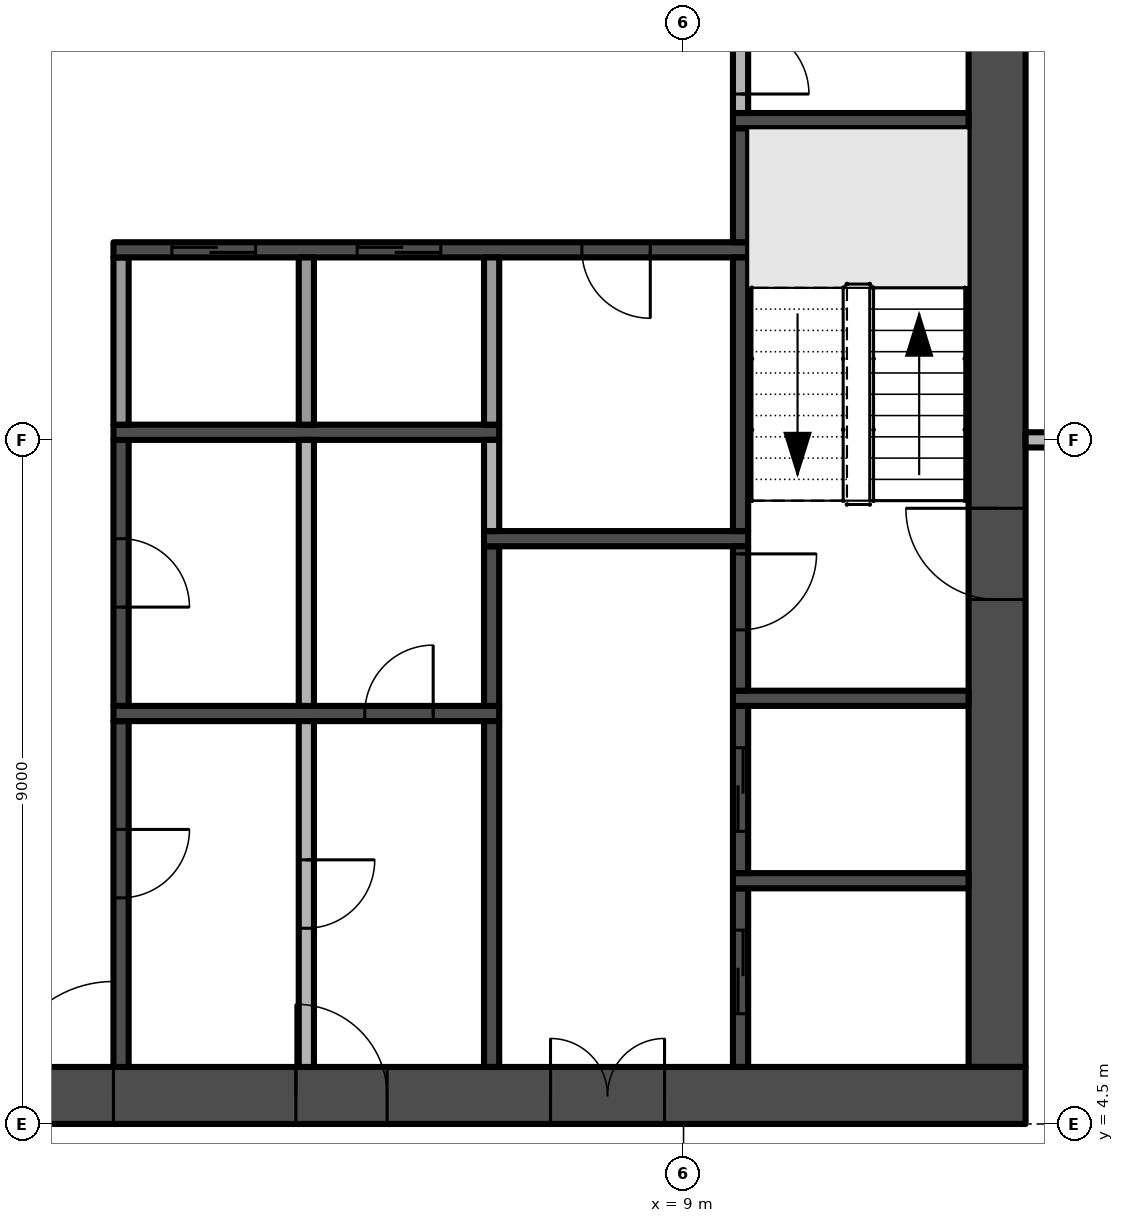
"""IFC4 building model, lengths in metres.
Left out: names, types, materials, properties, quantities, classifications, styles, units other than length and angle.
Written with IfcOpenShell. Run it as: python <this file> out.ifc"""

import sys

from ifc_helpers import new_model, si_unit, direction, frame, frame_2d, origin, place, context, subcontext, project, spatial, rectangle, extrude, element, fill, save


model = new_model("IFC4")
c1 = context("Model", 3, precision=1e-05, world=origin(), true_north=direction((0.0, 1.0)))
c2 = subcontext(c1, "Body", "Model", "MODEL_VIEW")
j1 = project(units=[si_unit("LENGTHUNIT", "METRE"), si_unit("PLANEANGLEUNIT", "RADIAN")], contexts=[c1])
p1 = place(None, origin())
s1 = spatial("IfcSite", under=j1, at=p1, CompositionType="ELEMENT")
p2 = place(p1, origin())
s2 = spatial("IfcBuilding", under=s1, at=p2, CompositionType="ELEMENT")
p3 = place(p2, frame((0.0, 0.0, 140.2)))
s3 = spatial("IfcBuildingStorey", under=s2, at=p3, CompositionType="ELEMENT", Elevation=140.2)
p4 = place(p3, frame((-13.5, 4.875, -0.3), z_axis=(0.0, 0.0, 1.0), x_axis=(1.0, 0.0, 0.0)))
e1 = element("IfcWall", 1, at=p4, inside=s3, PredefinedType="SHEAR", context=c2, shape_type="SweptSolid", body=[
    extrude(rectangle(XDim=27.0, YDim=0.75, at=frame_2d((13.5, 0.0))), origin(), (0.0, 0.0, 1.0), 3.8),
])
p5 = place(p4, frame((12.0, 0.0, 0.3)))
e2 = element("IfcOpeningElement", 2, at=p5, cuts=e1, PredefinedType="OPENING", context=c2, shape_type="SweptSolid", body=[
    extrude(rectangle(XDim=3.0, YDim=2.4, at=frame_2d((1.5, 1.2))), frame((0.0, 0.385, 0.0), z_axis=(0.0, -1.0, 0.0), x_axis=(1.0, 0.0, 0.0)), (0.0, 0.0, 1.0), 0.77),
])
p6 = place(p4, frame((4.9, 0.0, 0.3)))
e3 = element("IfcOpeningElement", 3, at=p6, cuts=e1, PredefinedType="OPENING", context=c2, shape_type="SweptSolid", body=[
    extrude(rectangle(XDim=1.2, YDim=2.2, at=frame_2d((0.6, 1.1))), frame((0.0, 0.385, 0.0), z_axis=(0.0, -1.0, 0.0), x_axis=(1.0, 0.0, 0.0)), (0.0, 0.0, 1.0), 0.77),
])
p7 = place(p4, frame((20.75, 0.0, 0.3)))
e4 = element("IfcOpeningElement", 4, at=p7, cuts=e1, PredefinedType="OPENING", context=c2, shape_type="SweptSolid", body=[
    extrude(rectangle(XDim=1.5, YDim=2.2, at=frame_2d((0.75, 1.1))), frame((0.0, 0.385, 0.0), z_axis=(0.0, -1.0, 0.0), x_axis=(1.0, 0.0, 0.0)), (0.0, 0.0, 1.0), 0.77),
])
p8 = place(p4, frame((17.4, 0.0, 0.3)))
e5 = element("IfcOpeningElement", 5, at=p8, cuts=e1, PredefinedType="OPENING", context=c2, shape_type="SweptSolid", body=[
    extrude(rectangle(XDim=1.2, YDim=2.2, at=frame_2d((0.6, 1.1))), frame((0.0, 0.385, 0.0), z_axis=(0.0, -1.0, 0.0), x_axis=(1.0, 0.0, 0.0)), (0.0, 0.0, 1.0), 0.77),
])
p9 = place(p3, frame((13.125, 5.25, -0.3), z_axis=(0.0, 0.0, 1.0), x_axis=(0.0, 1.0, 0.0)))
e6 = element("IfcWall", 6, at=p9, inside=s3, PredefinedType="SHEAR", context=c2, shape_type="SweptSolid", body=[
    extrude(rectangle(XDim=16.5, YDim=0.75, at=frame_2d((8.25, 0.0))), origin(), (0.0, 0.0, 1.0), 3.8),
])
p10 = place(p9, frame((6.15, 0.0, 0.3)))
e7 = element("IfcOpeningElement", 7, at=p10, cuts=e6, PredefinedType="OPENING", context=c2, shape_type="SweptSolid", body=[
    extrude(rectangle(XDim=1.2, YDim=2.2, at=frame_2d((0.6, 1.1))), frame((0.0, 0.385, 0.0), z_axis=(0.0, -1.0, 0.0), x_axis=(1.0, 0.0, 0.0)), (0.0, 0.0, 1.0), 0.77),
])
p11 = place(p3, frame((1.6, 9.8, 0.0), z_axis=(0.0, 0.0, 1.0), x_axis=(0.0, -1.0, 0.0)))
e8 = element("IfcWall", 8, at=p11, inside=s3, PredefinedType="SHEAR", context=c2, shape_type="SweptSolid", body=[
    extrude(rectangle(XDim=4.55, YDim=0.2, at=frame_2d((2.275, 0.0))), origin(), (0.0, 0.0, 1.0), 3.5),
])
p12 = place(p11, frame((1.425, 0.0, 0.0)))
e9 = element("IfcOpeningElement", 9, at=p12, cuts=e8, PredefinedType="OPENING", context=c2, shape_type="SweptSolid", body=[
    extrude(rectangle(XDim=0.9, YDim=2.1, at=frame_2d((0.45, 1.05))), frame((0.0, 0.11, 0.0), z_axis=(0.0, -1.0, 0.0), x_axis=(1.0, 0.0, 0.0)), (0.0, 0.0, 1.0), 0.22),
])
p13 = place(p3, frame((1.5, 9.9, 0.0), z_axis=(0.0, 0.0, 1.0), x_axis=(1.0, 0.0, 0.0)))
e10 = element("IfcWall", 10, at=p13, inside=s3, PredefinedType="SHEAR", context=c2, shape_type="SweptSolid", body=[
    extrude(rectangle(XDim=5.075, YDim=0.2, at=frame_2d((2.538, 0.0))), origin(), (0.0, 0.0, 1.0), 3.5),
])
p14 = place(p13, frame((3.306, 0.0, 0.0)))
e11 = element("IfcOpeningElement", 11, at=p14, cuts=e10, PredefinedType="OPENING", context=c2, shape_type="SweptSolid", body=[
    extrude(rectangle(XDim=0.9, YDim=2.1, at=frame_2d((0.45, 1.05))), frame((0.0, 0.11, 0.0), z_axis=(0.0, -1.0, 0.0), x_axis=(1.0, 0.0, 0.0)), (0.0, 0.0, 1.0), 0.22),
])
p15 = place(p3, frame((1.6, 13.5, 0.0), z_axis=(0.0, 0.0, 1.0), x_axis=(0.0, -1.0, 0.0)))
e12 = element("IfcWall", 12, at=p15, inside=s3, PredefinedType="SHEAR", context=c2, shape_type="SweptSolid", body=[
    extrude(rectangle(XDim=3.5, YDim=0.2, at=frame_2d((1.75, 0.0))), origin(), (0.0, 0.0, 1.0), 3.5),
])
p16 = place(p15, frame((1.3, 0.0, 0.0)))
e13 = element("IfcOpeningElement", 13, at=p16, cuts=e12, PredefinedType="OPENING", context=c2, shape_type="SweptSolid", body=[
    extrude(rectangle(XDim=0.9, YDim=2.1, at=frame_2d((0.45, 1.05))), frame((0.0, 0.11, 0.0), z_axis=(0.0, -1.0, 0.0), x_axis=(1.0, 0.0, 0.0)), (0.0, 0.0, 1.0), 0.22),
])
p17 = place(p3, frame((1.5, 13.6, 0.0), z_axis=(0.0, 0.0, 1.0), x_axis=(1.0, 0.0, 0.0)))
e14 = element("IfcWall", 14, at=p17, inside=s3, PredefinedType="SHEAR", context=c2, shape_type="SweptSolid", body=[
    extrude(rectangle(XDim=5.075, YDim=0.2, at=frame_2d((2.538, 0.0))), origin(), (0.0, 0.0, 1.0), 3.5),
])
p18 = place(p3, frame((1.6, 13.7, 0.0), z_axis=(0.0, 0.0, 1.0), x_axis=(0.0, 1.0, 0.0)))
e15 = element("IfcWall", 15, at=p18, inside=s3, PredefinedType="PARTITIONING", context=c2, shape_type="SweptSolid", body=[
    extrude(rectangle(XDim=2.2, YDim=0.2, at=frame_2d((1.1, 0.0))), origin(), (0.0, 0.0, 1.0), 3.5),
])
p19 = place(p3, frame((9.85, 16.0, 0.0), z_axis=(0.0, 0.0, 1.0), x_axis=(-1.0, 0.0, 0.0)))
e16 = element("IfcWall", 16, at=p19, inside=s3, PredefinedType="SHEAR", context=c2, shape_type="SweptSolid", body=[
    extrude(rectangle(XDim=8.35, YDim=0.2, at=frame_2d((4.175, 0.0))), origin(), (0.0, 0.0, 1.0), 3.5),
])
p20 = place(p19, frame((6.481, 0.0, 0.0)))
e17 = element("IfcOpeningElement", 17, at=p20, cuts=e16, PredefinedType="OPENING", context=c2, shape_type="SweptSolid", body=[
    extrude(rectangle(XDim=1.1, YDim=2.1, at=frame_2d((0.55, 1.05))), frame((0.0, 0.11, 0.0), z_axis=(0.0, -1.0, 0.0), x_axis=(1.0, 0.0, 0.0)), (0.0, 0.0, 1.0), 0.22),
])
p21 = place(p19, frame((4.044, 0.0, 0.0)))
e18 = element("IfcOpeningElement", 18, at=p21, cuts=e16, PredefinedType="OPENING", context=c2, shape_type="SweptSolid", body=[
    extrude(rectangle(XDim=1.1, YDim=2.1, at=frame_2d((0.55, 1.05))), frame((0.0, 0.11, 0.0), z_axis=(0.0, -1.0, 0.0), x_axis=(1.0, 0.0, 0.0)), (0.0, 0.0, 1.0), 0.22),
])
p22 = place(p19, frame((1.288, 0.0, 0.0)))
e19 = element("IfcOpeningElement", 19, at=p22, cuts=e16, PredefinedType="OPENING", context=c2, shape_type="SweptSolid", body=[
    extrude(rectangle(XDim=0.9, YDim=2.1, at=frame_2d((0.45, 1.05))), frame((0.0, 0.11, 0.0), z_axis=(0.0, -1.0, 0.0), x_axis=(1.0, 0.0, 0.0)), (0.0, 0.0, 1.0), 0.22),
])
p23 = place(p3, frame((4.037, 9.8, 0.0), z_axis=(0.0, 0.0, 1.0), x_axis=(0.0, -1.0, 0.0)))
e20 = element("IfcWall", 20, at=p23, inside=s3, PredefinedType="PARTITIONING", context=c2, shape_type="SweptSolid", body=[
    extrude(rectangle(XDim=4.55, YDim=0.2, at=frame_2d((2.275, 0.0))), origin(), (0.0, 0.0, 1.0), 3.5),
])
p24 = place(p23, frame((1.825, 0.0, 0.0)))
e21 = element("IfcOpeningElement", 21, at=p24, cuts=e20, PredefinedType="OPENING", context=c2, shape_type="SweptSolid", body=[
    extrude(rectangle(XDim=0.9, YDim=2.1, at=frame_2d((0.45, 1.05))), frame((0.0, 0.11, 0.0), z_axis=(0.0, -1.0, 0.0), x_axis=(1.0, 0.0, 0.0)), (0.0, 0.0, 1.0), 0.22),
])
p25 = place(p3, frame((4.037, 10.0, 0.0), z_axis=(0.0, 0.0, 1.0), x_axis=(0.0, 1.0, 0.0)))
e22 = element("IfcWall", 22, at=p25, inside=s3, PredefinedType="PARTITIONING", context=c2, shape_type="SweptSolid", body=[
    extrude(rectangle(XDim=3.5, YDim=0.2, at=frame_2d((1.75, 0.0))), origin(), (0.0, 0.0, 1.0), 3.5),
])
p26 = place(p3, frame((4.037, 13.7, 0.0), z_axis=(0.0, 0.0, 1.0), x_axis=(0.0, 1.0, 0.0)))
e23 = element("IfcWall", 23, at=p26, inside=s3, PredefinedType="PARTITIONING", context=c2, shape_type="SweptSolid", body=[
    extrude(rectangle(XDim=2.2, YDim=0.2, at=frame_2d((1.1, 0.0))), origin(), (0.0, 0.0, 1.0), 3.5),
])
p27 = place(p3, frame((6.475, 5.25, 0.0), z_axis=(0.0, 0.0, 1.0), x_axis=(0.0, 1.0, 0.0)))
e24 = element("IfcWall", 24, at=p27, inside=s3, PredefinedType="SHEAR", context=c2, shape_type="SweptSolid", body=[
    extrude(rectangle(XDim=4.55, YDim=0.2, at=frame_2d((2.275, 0.0))), origin(), (0.0, 0.0, 1.0), 3.5),
])
p28 = place(p3, frame((6.475, 10.0, 0.0), z_axis=(0.0, 0.0, 1.0), x_axis=(0.0, 1.0, 0.0)))
e25 = element("IfcWall", 25, at=p28, inside=s3, PredefinedType="SHEAR", context=c2, shape_type="SweptSolid", body=[
    extrude(rectangle(XDim=2.1, YDim=0.2, at=frame_2d((1.05, 0.0))), origin(), (0.0, 0.0, 1.0), 3.5),
])
p29 = place(p3, frame((6.375, 12.2, 0.0), z_axis=(0.0, 0.0, 1.0), x_axis=(1.0, 0.0, 0.0)))
e26 = element("IfcWall", 26, at=p29, inside=s3, PredefinedType="SHEAR", context=c2, shape_type="SweptSolid", body=[
    extrude(rectangle(XDim=3.475, YDim=0.2, at=frame_2d((1.738, 0.0))), origin(), (0.0, 0.0, 1.0), 3.5),
])
p30 = place(p3, frame((6.475, 12.3, 0.0), z_axis=(0.0, 0.0, 1.0), x_axis=(0.0, 1.0, 0.0)))
e27 = element("IfcWall", 27, at=p30, inside=s3, PredefinedType="PARTITIONING", context=c2, shape_type="SweptSolid", body=[
    extrude(rectangle(XDim=1.2, YDim=0.2, at=frame_2d((0.6, 0.0))), origin(), (0.0, 0.0, 1.0), 3.5),
])
p31 = place(p3, frame((6.475, 13.7, 0.0), z_axis=(0.0, 0.0, 1.0), x_axis=(0.0, 1.0, 0.0)))
e28 = element("IfcWall", 28, at=p31, inside=s3, PredefinedType="PARTITIONING", context=c2, shape_type="SweptSolid", body=[
    extrude(rectangle(XDim=2.2, YDim=0.2, at=frame_2d((1.1, 0.0))), origin(), (0.0, 0.0, 1.0), 3.5),
])
p32 = place(p3, frame((9.75, 5.25, 0.0), z_axis=(0.0, 0.0, 1.0), x_axis=(0.0, 1.0, 0.0)))
e29 = element("IfcWall", 29, at=p32, inside=s3, PredefinedType="SHEAR", context=c2, shape_type="SweptSolid", body=[
    extrude(rectangle(XDim=2.35, YDim=0.2, at=frame_2d((1.175, 0.0))), origin(), (0.0, 0.0, 1.0), 3.5),
])
p33 = place(p32, frame((0.7, 0.0, 0.0)))
e30 = element("IfcOpeningElement", 30, at=p33, cuts=e29, PredefinedType="OPENING", context=c2, shape_type="SweptSolid", body=[
    extrude(rectangle(XDim=1.1, YDim=2.1, at=frame_2d((0.55, 1.05))), frame((0.0, 0.11, 0.0), z_axis=(0.0, -1.0, 0.0), x_axis=(1.0, 0.0, 0.0)), (0.0, 0.0, 1.0), 0.22),
])
p34 = place(p3, frame((9.65, 7.7, 0.0), z_axis=(0.0, 0.0, 1.0), x_axis=(1.0, 0.0, 0.0)))
e31 = element("IfcWall", 31, at=p34, inside=s3, PredefinedType="SHEAR", context=c2, shape_type="SweptSolid", body=[
    extrude(rectangle(XDim=3.1, YDim=0.2, at=frame_2d((1.55, 0.0))), origin(), (0.0, 0.0, 1.0), 3.5),
])
p35 = place(p3, frame((9.75, 7.8, 0.0), z_axis=(0.0, 0.0, 1.0), x_axis=(0.0, 1.0, 0.0)))
e32 = element("IfcWall", 32, at=p35, inside=s3, PredefinedType="SHEAR", context=c2, shape_type="SweptSolid", body=[
    extrude(rectangle(XDim=2.2, YDim=0.2, at=frame_2d((1.1, 0.0))), origin(), (0.0, 0.0, 1.0), 3.5),
])
p36 = place(p35, frame((0.55, 0.0, 0.0)))
e33 = element("IfcOpeningElement", 33, at=p36, cuts=e32, PredefinedType="OPENING", context=c2, shape_type="SweptSolid", body=[
    extrude(rectangle(XDim=1.1, YDim=2.1, at=frame_2d((0.55, 1.05))), frame((0.0, 0.11, 0.0), z_axis=(0.0, -1.0, 0.0), x_axis=(1.0, 0.0, 0.0)), (0.0, 0.0, 1.0), 0.22),
])
p37 = place(p3, frame((9.65, 10.1, 0.0), z_axis=(0.0, 0.0, 1.0), x_axis=(1.0, 0.0, 0.0)))
e34 = element("IfcWall", 34, at=p37, inside=s3, PredefinedType="SHEAR", context=c2, shape_type="SweptSolid", body=[
    extrude(rectangle(XDim=3.1, YDim=0.2, at=frame_2d((1.55, 0.0))), origin(), (0.0, 0.0, 1.0), 3.5),
])
p38 = place(p3, frame((9.75, 12.1, 0.0), z_axis=(0.0, 0.0, 1.0), x_axis=(0.0, -1.0, 0.0)))
e35 = element("IfcWall", 35, at=p38, inside=s3, PredefinedType="SHEAR", context=c2, shape_type="SweptSolid", body=[
    extrude(rectangle(XDim=1.9, YDim=0.2, at=frame_2d((0.95, 0.0))), origin(), (0.0, 0.0, 1.0), 3.5),
])
p39 = place(p38, frame((0.1, 0.0, 0.0)))
e36 = element("IfcOpeningElement", 36, at=p39, cuts=e35, PredefinedType="OPENING", context=c2, shape_type="SweptSolid", body=[
    extrude(rectangle(XDim=1.0, YDim=2.2, at=frame_2d((0.5, 1.1))), frame((0.0, 0.11, 0.0), z_axis=(0.0, -1.0, 0.0), x_axis=(1.0, 0.0, 0.0)), (0.0, 0.0, 1.0), 0.22),
])
p40 = place(p3, frame((9.75, 12.3, 0.0), z_axis=(0.0, 0.0, 1.0), x_axis=(0.0, 1.0, 0.0)))
e37 = element("IfcWall", 37, at=p40, inside=s3, PredefinedType="SHEAR", context=c2, shape_type="SweptSolid", body=[
    extrude(rectangle(XDim=3.6, YDim=0.2, at=frame_2d((1.8, 0.0))), origin(), (0.0, 0.0, 1.0), 3.5),
])
p41 = place(p3, frame((9.75, 16.1, 0.0), z_axis=(0.0, 0.0, 1.0), x_axis=(0.0, 1.0, 0.0)))
e38 = element("IfcWall", 38, at=p41, inside=s3, PredefinedType="SHEAR", context=c2, shape_type="SweptSolid", body=[
    extrude(rectangle(XDim=1.5, YDim=0.2, at=frame_2d((0.75, 0.0))), origin(), (0.0, 0.0, 1.0), 3.5),
])
p42 = place(p3, frame((9.65, 17.7, 0.0), z_axis=(0.0, 0.0, 1.0), x_axis=(1.0, 0.0, 0.0)))
e39 = element("IfcWall", 39, at=p42, inside=s3, PredefinedType="SHEAR", context=c2, shape_type="SweptSolid", body=[
    extrude(rectangle(XDim=3.1, YDim=0.2, at=frame_2d((1.55, 0.0))), origin(), (0.0, 0.0, 1.0), 3.5),
])
p43 = place(p3, frame((9.75, 19.2, 0.0), z_axis=(0.0, 0.0, 1.0), x_axis=(0.0, -1.0, 0.0)))
e40 = element("IfcWall", 40, at=p43, inside=s3, PredefinedType="PARTITIONING", context=c2, shape_type="SweptSolid", body=[
    extrude(rectangle(XDim=1.4, YDim=0.2, at=frame_2d((0.7, 0.0))), origin(), (0.0, 0.0, 1.0), 3.5),
])
p44 = place(p43, frame((0.25, 0.0, 0.0)))
e41 = element("IfcOpeningElement", 41, at=p44, cuts=e40, PredefinedType="OPENING", context=c2, shape_type="SweptSolid", body=[
    extrude(rectangle(XDim=0.9, YDim=2.1, at=frame_2d((0.45, 1.05))), frame((0.0, 0.11, 0.0), z_axis=(0.0, -1.0, 0.0), x_axis=(1.0, 0.0, 0.0)), (0.0, 0.0, 1.0), 0.22),
])
p45 = place(p3, frame((13.5, 13.5, 0.0), z_axis=(0.0, 0.0, 1.0), x_axis=(1.0, 0.0, 0.0)))
e42 = element("IfcWall", 42, at=p45, inside=s3, PredefinedType="PARTITIONING", context=c2, shape_type="SweptSolid", body=[
    extrude(rectangle(XDim=3.875, YDim=0.2, at=frame_2d((1.938, 0.0))), origin(), (0.0, 0.0, 1.0), 3.5),
])
p46 = place(p45, frame((1.6, 0.0, 0.0)))
e43 = element("IfcOpeningElement", 43, at=p46, cuts=e42, PredefinedType="OPENING", context=c2, shape_type="SweptSolid", body=[
    extrude(rectangle(XDim=0.9, YDim=2.1, at=frame_2d((0.45, 1.05))), frame((0.0, 0.11, 0.0), z_axis=(0.0, -1.0, 0.0), x_axis=(1.0, 0.0, 0.0)), (0.0, 0.0, 1.0), 0.22),
])
p47 = place(p5, frame((3.0, 0.0, 0.0), z_axis=(0.0, 0.0, 1.0), x_axis=(-1.0, 0.0, 0.0)))
e44 = element("IfcDoor", 44, at=p47, inside=s3, OperationType="DOUBLE_DOOR_SINGLE_SWING", PredefinedType="DOOR", context=c2, shape_type="SweptSolid", body=[
    extrude(rectangle(XDim=3.0, YDim=2.4, at=frame_2d((1.5, 1.2))), frame((0.0, 0.025, 0.0), z_axis=(0.0, -1.0, 0.0), x_axis=(1.0, 0.0, 0.0)), (0.0, 0.0, 1.0), 0.05),
])
fill(e2, e44)
p48 = place(p10, frame((1.2, 0.0, 0.0), z_axis=(0.0, 0.0, 1.0), x_axis=(-1.0, 0.0, 0.0)))
e45 = element("IfcDoor", 45, at=p48, inside=s3, OperationType="SINGLE_SWING_LEFT", PredefinedType="DOOR", context=c2, shape_type="SweptSolid", body=[
    extrude(rectangle(XDim=1.2, YDim=2.2, at=frame_2d((0.6, 1.1))), frame((0.0, 0.025, 0.0), z_axis=(0.0, -1.0, 0.0), x_axis=(1.0, 0.0, 0.0)), (0.0, 0.0, 1.0), 0.05),
])
fill(e7, e45)
p49 = place(p7, frame((1.5, 0.0, 0.0), z_axis=(0.0, 0.0, 1.0), x_axis=(-1.0, 0.0, 0.0)))
e46 = element("IfcDoor", 46, at=p49, inside=s3, OperationType="DOUBLE_DOOR_SINGLE_SWING", PredefinedType="DOOR", context=c2, shape_type="SweptSolid", body=[
    extrude(rectangle(XDim=1.5, YDim=2.2, at=frame_2d((0.75, 1.1))), frame((0.0, 0.025, 0.0), z_axis=(0.0, -1.0, 0.0), x_axis=(1.0, 0.0, 0.0)), (0.0, 0.0, 1.0), 0.05),
])
fill(e4, e46)
p50 = place(p8, frame((1.2, 0.0, 0.0), z_axis=(0.0, 0.0, 1.0), x_axis=(-1.0, 0.0, 0.0)))
e47 = element("IfcDoor", 47, at=p50, inside=s3, OperationType="SINGLE_SWING_RIGHT", PredefinedType="DOOR", context=c2, shape_type="SweptSolid", body=[
    extrude(rectangle(XDim=1.2, YDim=2.2, at=frame_2d((0.6, 1.1))), frame((0.0, 0.025, 0.0), z_axis=(0.0, -1.0, 0.0), x_axis=(1.0, 0.0, 0.0)), (0.0, 0.0, 1.0), 0.05),
])
fill(e5, e47)
p51 = place(p39, origin())
e48 = element("IfcDoor", 48, at=p51, inside=s3, OperationType="SINGLE_SWING_LEFT", PredefinedType="DOOR", context=c2, shape_type="SweptSolid", body=[
    extrude(rectangle(XDim=1.0, YDim=2.2, at=frame_2d((0.5, 1.1))), frame((0.0, 0.025, 0.0), z_axis=(0.0, -1.0, 0.0), x_axis=(1.0, 0.0, 0.0)), (0.0, 0.0, 1.0), 0.05),
])
fill(e36, e48)
p52 = place(p20, origin())
e49 = element("IfcDoor", 49, at=p52, inside=s3, OperationType="SLIDING_TO_RIGHT", PredefinedType="DOOR", context=c2, shape_type="SweptSolid", body=[
    extrude(rectangle(XDim=1.1, YDim=2.1, at=frame_2d((0.55, 1.05))), frame((0.0, 0.025, 0.0), z_axis=(0.0, -1.0, 0.0), x_axis=(1.0, 0.0, 0.0)), (0.0, 0.0, 1.0), 0.05),
])
fill(e17, e49)
p53 = place(p21, origin())
e50 = element("IfcDoor", 50, at=p53, inside=s3, OperationType="SLIDING_TO_RIGHT", PredefinedType="DOOR", context=c2, shape_type="SweptSolid", body=[
    extrude(rectangle(XDim=1.1, YDim=2.1, at=frame_2d((0.55, 1.05))), frame((0.0, 0.025, 0.0), z_axis=(0.0, -1.0, 0.0), x_axis=(1.0, 0.0, 0.0)), (0.0, 0.0, 1.0), 0.05),
])
fill(e18, e50)
p54 = place(p33, origin())
e51 = element("IfcDoor", 51, at=p54, inside=s3, OperationType="SLIDING_TO_RIGHT", PredefinedType="DOOR", context=c2, shape_type="SweptSolid", body=[
    extrude(rectangle(XDim=1.1, YDim=2.1, at=frame_2d((0.55, 1.05))), frame((0.0, 0.025, 0.0), z_axis=(0.0, -1.0, 0.0), x_axis=(1.0, 0.0, 0.0)), (0.0, 0.0, 1.0), 0.05),
])
fill(e30, e51)
p55 = place(p36, origin())
e52 = element("IfcDoor", 52, at=p55, inside=s3, OperationType="SLIDING_TO_RIGHT", PredefinedType="DOOR", context=c2, shape_type="SweptSolid", body=[
    extrude(rectangle(XDim=1.1, YDim=2.1, at=frame_2d((0.55, 1.05))), frame((0.0, 0.025, 0.0), z_axis=(0.0, -1.0, 0.0), x_axis=(1.0, 0.0, 0.0)), (0.0, 0.0, 1.0), 0.05),
])
fill(e33, e52)
p56 = place(p12, origin())
e53 = element("IfcDoor", 53, at=p56, inside=s3, OperationType="SINGLE_SWING_LEFT", PredefinedType="DOOR", context=c2, shape_type="SweptSolid", body=[
    extrude(rectangle(XDim=0.9, YDim=2.1, at=frame_2d((0.45, 1.05))), frame((0.0, 0.025, 0.0), z_axis=(0.0, -1.0, 0.0), x_axis=(1.0, 0.0, 0.0)), (0.0, 0.0, 1.0), 0.05),
])
fill(e9, e53)
p57 = place(p24, origin())
e54 = element("IfcDoor", 54, at=p57, inside=s3, OperationType="SINGLE_SWING_LEFT", PredefinedType="DOOR", context=c2, shape_type="SweptSolid", body=[
    extrude(rectangle(XDim=0.9, YDim=2.1, at=frame_2d((0.45, 1.05))), frame((0.0, 0.025, 0.0), z_axis=(0.0, -1.0, 0.0), x_axis=(1.0, 0.0, 0.0)), (0.0, 0.0, 1.0), 0.05),
])
fill(e21, e54)
p58 = place(p16, origin())
e55 = element("IfcDoor", 55, at=p58, inside=s3, OperationType="SINGLE_SWING_RIGHT", PredefinedType="DOOR", context=c2, shape_type="SweptSolid", body=[
    extrude(rectangle(XDim=0.9, YDim=2.1, at=frame_2d((0.45, 1.05))), frame((0.0, 0.025, 0.0), z_axis=(0.0, -1.0, 0.0), x_axis=(1.0, 0.0, 0.0)), (0.0, 0.0, 1.0), 0.05),
])
fill(e13, e55)
p59 = place(p14, origin())
e56 = element("IfcDoor", 56, at=p59, inside=s3, OperationType="SINGLE_SWING_RIGHT", PredefinedType="DOOR", context=c2, shape_type="SweptSolid", body=[
    extrude(rectangle(XDim=0.9, YDim=2.1, at=frame_2d((0.45, 1.05))), frame((0.0, 0.025, 0.0), z_axis=(0.0, -1.0, 0.0), x_axis=(1.0, 0.0, 0.0)), (0.0, 0.0, 1.0), 0.05),
])
fill(e11, e56)
p60 = place(p22, origin())
e57 = element("IfcDoor", 57, at=p60, inside=s3, OperationType="SINGLE_SWING_LEFT", PredefinedType="DOOR", context=c2, shape_type="SweptSolid", body=[
    extrude(rectangle(XDim=0.9, YDim=2.1, at=frame_2d((0.45, 1.05))), frame((0.0, 0.025, 0.0), z_axis=(0.0, -1.0, 0.0), x_axis=(1.0, 0.0, 0.0)), (0.0, 0.0, 1.0), 0.05),
])
fill(e19, e57)
p61 = place(p44, origin())
e58 = element("IfcDoor", 58, at=p61, inside=s3, OperationType="SINGLE_SWING_RIGHT", PredefinedType="DOOR", context=c2, shape_type="SweptSolid", body=[
    extrude(rectangle(XDim=0.9, YDim=2.1, at=frame_2d((0.45, 1.05))), frame((0.0, 0.025, 0.0), z_axis=(0.0, -1.0, 0.0), x_axis=(1.0, 0.0, 0.0)), (0.0, 0.0, 1.0), 0.05),
])
fill(e41, e58)
save(model, sys.argv[1])
